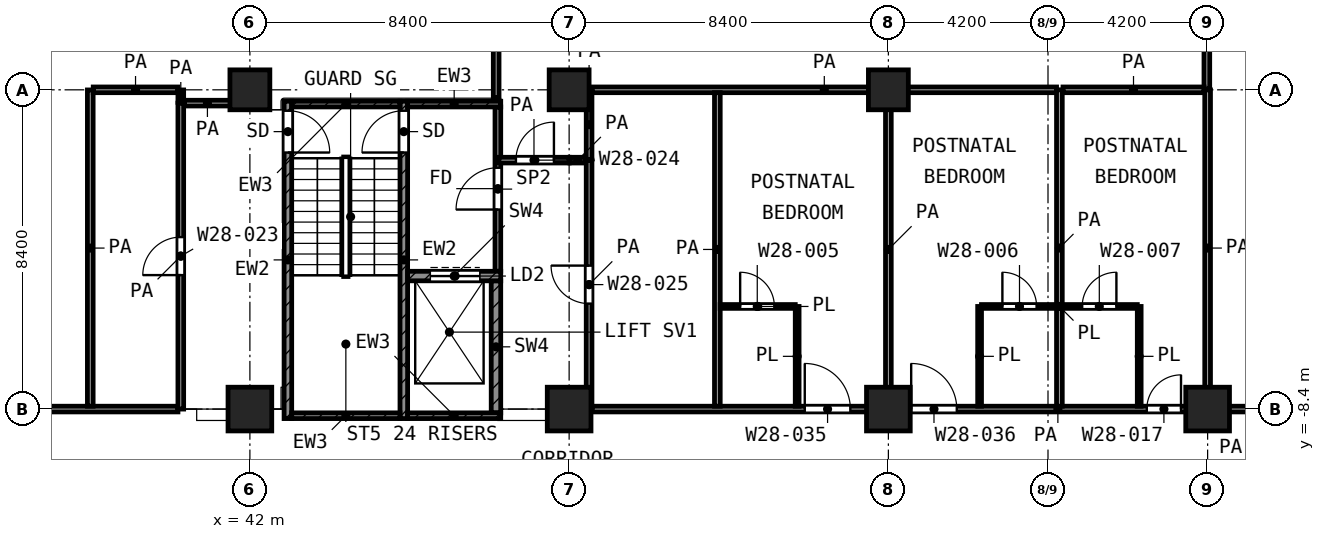
"""IFC4 building model, lengths in metres.
Left out: names, types, materials, properties, quantities, classifications, styles, units other than length and angle.
Written with IfcOpenShell. Run it as: python <this file> out.ifc"""

import sys

from ifc_helpers import new_model, si_unit, direction, frame, frame_2d, origin, origin_2d, place, context, subcontext, project, spatial, rectangle, extrude, element, fill, save


model = new_model("IFC4")
c1 = context("Model", 3, precision=1e-05, world=origin(), true_north=direction((0.0, 1.0)))
c2 = subcontext(c1, "Body", "Model", "MODEL_VIEW")
j1 = project(units=[si_unit("LENGTHUNIT", "METRE"), si_unit("PLANEANGLEUNIT", "RADIAN")], contexts=[c1])
p1 = place(None, origin())
s1 = spatial("IfcSite", under=j1, at=p1, CompositionType="ELEMENT")
p2 = place(p1, origin())
s2 = spatial("IfcBuilding", under=s1, at=p2, CompositionType="ELEMENT")
p3 = place(p2, frame((0.0, 0.0, 124.0)))
s3 = spatial("IfcBuildingStorey", under=s2, at=p3, CompositionType="ELEMENT", Elevation=124.0)
for number, where, z_axis, x_axis in (
    (1, (42.0, 0.0, 0.0), (0.0, 0.0, 1.0), (1.0, 0.0, 0.0)),
    (2, (50.4, 0.0, 0.0), (0.0, 0.0, 1.0), (1.0, 0.0, 0.0)),
    (3, (58.8, 0.0, 0.0), (0.0, 0.0, 1.0), (1.0, 0.0, 0.0)),
):
    element("IfcColumn", number, at=place(p3, frame(where, z_axis=z_axis, x_axis=x_axis)), inside=s3, PredefinedType="COLUMN", context=c2, shape_type="SweptSolid", body=[
        extrude(rectangle(XDim=1.05, YDim=1.05, at=origin_2d()), origin(), (0.0, 0.0, 1.0), 4.2),
    ])
for number, where, z_axis, x_axis in (
    (4, (42.0, -8.4, 0.0), (0.0, 0.0, 1.0), (1.0, 0.0, 0.0)),
    (5, (50.4, -8.4, 0.0), (0.0, 0.0, 1.0), (1.0, 0.0, 0.0)),
    (6, (58.8, -8.4, 0.0), (0.0, 0.0, 1.0), (1.0, 0.0, 0.0)),
    (7, (67.2, -8.4, 0.0), (0.0, 0.0, 1.0), (1.0, 0.0, 0.0)),
):
    element("IfcColumn", number, at=place(p3, frame(where, z_axis=z_axis, x_axis=x_axis)), inside=s3, PredefinedType="COLUMN", context=c2, shape_type="SweptSolid", body=[
        extrude(rectangle(XDim=1.15, YDim=1.15, at=origin_2d()), origin(), (0.0, 0.0, 1.0), 4.2),
    ])
p4 = place(p3, frame((43.0, -8.65, 0.0), z_axis=(0.0, 0.0, 1.0), x_axis=(0.0, 1.0, 0.0)))
e8 = element("IfcWall", 8, at=p4, inside=s3, PredefinedType="SHEAR", context=c2, shape_type="SweptSolid", body=[
    extrude(rectangle(XDim=8.35, YDim=0.2, at=frame_2d((4.175, 0.0))), origin(), (0.0, 0.0, 1.0), 3.6),
])
p5 = place(p4, frame((7.0, 0.0, 0.0)))
e9 = element("IfcOpeningElement", 9, at=p5, cuts=e8, PredefinedType="OPENING", context=c2, shape_type="SweptSolid", body=[
    extrude(rectangle(XDim=1.1, YDim=2.1, at=frame_2d((0.55, 1.05))), frame((0.0, 0.11, 0.0), z_axis=(0.0, -1.0, 0.0), x_axis=(1.0, 0.0, 0.0)), (0.0, 0.0, 1.0), 0.22),
])
p6 = place(p3, frame((46.05, -8.65, 0.0), z_axis=(0.0, 0.0, 1.0), x_axis=(0.0, 1.0, 0.0)))
e10 = element("IfcWall", 10, at=p6, inside=s3, PredefinedType="SHEAR", context=c2, shape_type="SweptSolid", body=[
    extrude(rectangle(XDim=8.35, YDim=0.2, at=frame_2d((4.175, 0.0))), origin(), (0.0, 0.0, 1.0), 3.6),
])
p7 = place(p6, frame((7.0, 0.0, 0.0)))
e11 = element("IfcOpeningElement", 11, at=p7, cuts=e10, PredefinedType="OPENING", context=c2, shape_type="SweptSolid", body=[
    extrude(rectangle(XDim=1.1, YDim=2.1, at=frame_2d((0.55, 1.05))), frame((0.0, 0.11, 0.0), z_axis=(0.0, -1.0, 0.0), x_axis=(1.0, 0.0, 0.0)), (0.0, 0.0, 1.0), 0.22),
])
p8 = place(p3, frame((43.1, -0.375, 0.0), z_axis=(0.0, 0.0, 1.0), x_axis=(1.0, 0.0, 0.0)))
e12 = element("IfcWall", 12, at=p8, inside=s3, PredefinedType="SHEAR", context=c2, shape_type="SweptSolid", body=[
    extrude(rectangle(XDim=2.85, YDim=0.15, at=frame_2d((1.425, 0.0))), origin(), (0.0, 0.0, 1.0), 3.6),
])
p9 = place(p3, frame((46.15, -0.375, 0.0), z_axis=(0.0, 0.0, 1.0), x_axis=(1.0, 0.0, 0.0)))
e13 = element("IfcWall", 13, at=p9, inside=s3, PredefinedType="SHEAR", context=c2, shape_type="SweptSolid", body=[
    extrude(rectangle(XDim=2.45, YDim=0.15, at=frame_2d((1.225, 0.0))), origin(), (0.0, 0.0, 1.0), 3.6),
])
p10 = place(p3, frame((43.1, -8.575, 0.0), z_axis=(0.0, 0.0, 1.0), x_axis=(1.0, 0.0, 0.0)))
e14 = element("IfcWall", 14, at=p10, inside=s3, PredefinedType="SHEAR", context=c2, shape_type="SweptSolid", body=[
    extrude(rectangle(XDim=2.85, YDim=0.15, at=frame_2d((1.425, 0.0))), origin(), (0.0, 0.0, 1.0), 3.6),
])
p11 = place(p3, frame((46.15, -8.575, 0.0), z_axis=(0.0, 0.0, 1.0), x_axis=(1.0, 0.0, 0.0)))
e15 = element("IfcWall", 15, at=p11, inside=s3, PredefinedType="SHEAR", context=c2, shape_type="SweptSolid", body=[
    extrude(rectangle(XDim=2.45, YDim=0.15, at=frame_2d((1.225, 0.0))), origin(), (0.0, 0.0, 1.0), 3.6),
])
p12 = place(p3, frame((46.15, -4.9, 0.0), z_axis=(0.0, 0.0, 1.0), x_axis=(1.0, 0.0, 0.0)))
e16 = element("IfcWall", 16, at=p12, inside=s3, PredefinedType="SHEAR", context=c2, shape_type="SweptSolid", body=[
    extrude(rectangle(XDim=2.45, YDim=0.25, at=frame_2d((1.225, 0.0))), origin(), (0.0, 0.0, 1.0), 3.6),
])
p13 = place(p12, frame((0.6, 0.0, 0.0)))
e17 = element("IfcOpeningElement", 17, at=p13, cuts=e16, PredefinedType="OPENING", context=c2, shape_type="SweptSolid", body=[
    extrude(rectangle(XDim=1.3, YDim=2.1, at=frame_2d((0.65, 1.05))), frame((0.0, 0.135, 0.0), z_axis=(0.0, -1.0, 0.0), x_axis=(1.0, 0.0, 0.0)), (0.0, 0.0, 1.0), 0.27),
])
p14 = place(p3, frame((48.475, -8.5, 0.0), z_axis=(0.0, 0.0, 1.0), x_axis=(0.0, 1.0, 0.0)))
e18 = element("IfcWall", 18, at=p14, inside=s3, PredefinedType="SHEAR", context=c2, shape_type="SweptSolid", body=[
    extrude(rectangle(XDim=3.475, YDim=0.25, at=frame_2d((1.738, 0.0))), origin(), (0.0, 0.0, 1.0), 3.6),
])
p15 = place(p3, frame((48.525, -4.775, 0.0), z_axis=(0.0, 0.0, 1.0), x_axis=(0.0, 1.0, 0.0)))
e19 = element("IfcWall", 19, at=p15, inside=s3, PredefinedType="PARTITIONING", context=c2, shape_type="SweptSolid", body=[
    extrude(rectangle(XDim=4.325, YDim=0.15, at=frame_2d((2.163, 0.0))), origin(), (0.0, 0.0, 1.0), 3.6),
])
p16 = place(p15, frame((1.625, 0.0, 0.0)))
e20 = element("IfcOpeningElement", 20, at=p16, cuts=e19, PredefinedType="OPENING", context=c2, shape_type="SweptSolid", body=[
    extrude(rectangle(XDim=1.1, YDim=2.1, at=frame_2d((0.55, 1.05))), frame((0.0, 0.085, 0.0), z_axis=(0.0, -1.0, 0.0), x_axis=(1.0, 0.0, 0.0)), (0.0, 0.0, 1.0), 0.17),
])
p17 = place(p3, frame((54.375, -5.7, 0.0), z_axis=(0.0, 0.0, 1.0), x_axis=(1.0, 0.0, 0.0)))
e21 = element("IfcWall", 21, at=p17, inside=s3, PredefinedType="PARTITIONING", context=c2, shape_type="SweptSolid", body=[
    extrude(rectangle(XDim=1.975, YDim=0.1, at=frame_2d((0.988, 0.0))), origin(), (0.0, 0.0, 1.0), 3.6),
])
p18 = place(p17, frame((0.525, 0.0, 0.0)))
e22 = element("IfcOpeningElement", 22, at=p18, cuts=e21, PredefinedType="OPENING", context=c2, shape_type="SweptSolid", body=[
    extrude(rectangle(XDim=0.9, YDim=2.1, at=frame_2d((0.45, 1.05))), frame((0.0, 0.06, 0.0), z_axis=(0.0, -1.0, 0.0), x_axis=(1.0, 0.0, 0.0)), (0.0, 0.0, 1.0), 0.12),
])
p19 = place(p3, frame((61.25, -5.7, 0.0), z_axis=(0.0, 0.0, 1.0), x_axis=(1.0, 0.0, 0.0)))
e23 = element("IfcWall", 23, at=p19, inside=s3, PredefinedType="PARTITIONING", context=c2, shape_type="SweptSolid", body=[
    extrude(rectangle(XDim=4.1, YDim=0.1, at=frame_2d((2.05, 0.0))), origin(), (0.0, 0.0, 1.0), 3.6),
])
p20 = place(p19, frame((0.55, 0.0, 0.0)))
e24 = element("IfcOpeningElement", 24, at=p20, cuts=e23, PredefinedType="OPENING", context=c2, shape_type="SweptSolid", body=[
    extrude(rectangle(XDim=0.9, YDim=2.1, at=frame_2d((0.45, 1.05))), frame((0.0, 0.06, 0.0), z_axis=(0.0, -1.0, 0.0), x_axis=(1.0, 0.0, 0.0)), (0.0, 0.0, 1.0), 0.12),
])
p21 = place(p19, frame((2.65, 0.0, 0.0)))
e25 = element("IfcOpeningElement", 25, at=p21, cuts=e23, PredefinedType="OPENING", context=c2, shape_type="SweptSolid", body=[
    extrude(rectangle(XDim=0.9, YDim=2.1, at=frame_2d((0.45, 1.05))), frame((0.0, 0.06, 0.0), z_axis=(0.0, -1.0, 0.0), x_axis=(1.0, 0.0, 0.0)), (0.0, 0.0, 1.0), 0.12),
])
for number, where, z_axis, x_axis in (
    (26, (56.4, -8.325, 0.0), (0.0, 0.0, 1.0), (0.0, 1.0, 0.0)),
    (27, (61.2, -8.325, 0.0), (0.0, 0.0, 1.0), (0.0, 1.0, 0.0)),
    (28, (65.4, -8.325, 0.0), (0.0, 0.0, 1.0), (0.0, 1.0, 0.0)),
):
    element("IfcWall", number, at=place(p3, frame(where, z_axis=z_axis, x_axis=x_axis)), inside=s3, PredefinedType="PARTITIONING", context=c2, shape_type="SweptSolid", body=[
        extrude(rectangle(XDim=2.625, YDim=0.1, at=frame_2d((1.312, 0.0))), origin(), (0.0, 0.0, 1.0), 3.6),
    ])
p22 = place(p3, frame((25.0, -8.4, 0.0), z_axis=(0.0, 0.0, 1.0), x_axis=(1.0, 0.0, 0.0)))
e29 = element("IfcWall", 29, at=p22, inside=s3, PredefinedType="PARTITIONING", context=c2, shape_type="SweptSolid", body=[
    extrude(rectangle(XDim=15.107, YDim=0.15, at=frame_2d((7.553, 0.0))), origin(), (0.0, 0.0, 1.0), 3.6),
])
p23 = place(p22, frame((3.9, 0.0, 0.0)))
e30 = element("IfcOpeningElement", 30, at=p23, cuts=e29, PredefinedType="OPENING", context=c2, shape_type="SweptSolid", body=[
    extrude(rectangle(XDim=1.0, YDim=2.1, at=frame_2d((0.5, 1.05))), frame((0.0, 0.085, 0.0), z_axis=(0.0, -1.0, 0.0), x_axis=(1.0, 0.0, 0.0)), (0.0, 0.0, 1.0), 0.17),
])
p24 = place(p22, frame((10.1, 0.0, 0.0)))
e31 = element("IfcOpeningElement", 31, at=p24, cuts=e29, PredefinedType="OPENING", context=c2, shape_type="SweptSolid", body=[
    extrude(rectangle(XDim=1.2, YDim=2.1, at=frame_2d((0.6, 1.05))), frame((0.0, 0.085, 0.0), z_axis=(0.0, -1.0, 0.0), x_axis=(1.0, 0.0, 0.0)), (0.0, 0.0, 1.0), 0.17),
])
p25 = place(p3, frame((51.0, -8.4, 0.0), z_axis=(0.0, 0.0, 1.0), x_axis=(1.0, 0.0, 0.0)))
e32 = element("IfcWall", 32, at=p25, inside=s3, PredefinedType="PARTITIONING", context=c2, shape_type="SweptSolid", body=[
    extrude(rectangle(XDim=24.52, YDim=0.15, at=frame_2d((12.26, 0.0))), origin(), (0.0, 0.0, 1.0), 3.6),
])
p26 = place(p25, frame((5.6, 0.0, 0.0)))
e33 = element("IfcOpeningElement", 33, at=p26, cuts=e32, PredefinedType="OPENING", context=c2, shape_type="SweptSolid", body=[
    extrude(rectangle(XDim=1.2, YDim=2.1, at=frame_2d((0.6, 1.05))), frame((0.0, 0.085, 0.0), z_axis=(0.0, -1.0, 0.0), x_axis=(1.0, 0.0, 0.0)), (0.0, 0.0, 1.0), 0.17),
])
p27 = place(p25, frame((8.4, 0.0, 0.0)))
e34 = element("IfcOpeningElement", 34, at=p27, cuts=e32, PredefinedType="OPENING", context=c2, shape_type="SweptSolid", body=[
    extrude(rectangle(XDim=1.2, YDim=2.1, at=frame_2d((0.6, 1.05))), frame((0.0, 0.085, 0.0), z_axis=(0.0, -1.0, 0.0), x_axis=(1.0, 0.0, 0.0)), (0.0, 0.0, 1.0), 0.17),
])
p28 = place(p25, frame((14.6, 0.0, 0.0)))
e35 = element("IfcOpeningElement", 35, at=p28, cuts=e32, PredefinedType="OPENING", context=c2, shape_type="SweptSolid", body=[
    extrude(rectangle(XDim=0.9, YDim=2.1, at=frame_2d((0.45, 1.05))), frame((0.0, 0.085, 0.0), z_axis=(0.0, -1.0, 0.0), x_axis=(1.0, 0.0, 0.0)), (0.0, 0.0, 1.0), 0.17),
])
p29 = place(p25, frame((19.65, 0.0, 0.0)))
e36 = element("IfcOpeningElement", 36, at=p29, cuts=e32, PredefinedType="OPENING", context=c2, shape_type="SweptSolid", body=[
    extrude(rectangle(XDim=1.5, YDim=2.1, at=frame_2d((0.75, 1.05))), frame((0.0, 0.085, 0.0), z_axis=(0.0, -1.0, 0.0), x_axis=(1.0, 0.0, 0.0)), (0.0, 0.0, 1.0), 0.17),
])
p30 = place(p3, frame((48.55, -1.85, 0.0), z_axis=(0.0, 0.0, 1.0), x_axis=(1.0, 0.0, 0.0)))
e37 = element("IfcWall", 37, at=p30, inside=s3, PredefinedType="PARTITIONING", context=c2, shape_type="SweptSolid", body=[
    extrude(rectangle(XDim=1.85, YDim=0.15, at=frame_2d((0.925, 0.0))), origin(), (0.0, 0.0, 1.0), 3.6),
])
p31 = place(p30, frame((0.45, 0.0, 0.0)))
e38 = element("IfcOpeningElement", 38, at=p31, cuts=e37, PredefinedType="OPENING", context=c2, shape_type="SweptSolid", body=[
    extrude(rectangle(XDim=1.0, YDim=2.1, at=frame_2d((0.5, 1.05))), frame((0.0, 0.085, 0.0), z_axis=(0.0, -1.0, 0.0), x_axis=(1.0, 0.0, 0.0)), (0.0, 0.0, 1.0), 0.17),
])
p32 = place(p3, frame((50.42, -1.85, 0.0), z_axis=(0.0, 0.0, 1.0), x_axis=(1.0, 0.0, 0.0)))
e39 = element("IfcWall", 39, at=p32, inside=s3, PredefinedType="PARTITIONING", context=c2, shape_type="SweptSolid", body=[
    extrude(rectangle(XDim=0.41, YDim=0.15, at=frame_2d((0.205, 0.0))), origin(), (0.0, 0.0, 1.0), 3.6),
])
p33 = place(p3, frame((40.277, -0.35, 0.0), z_axis=(0.0, 0.0, 1.0), x_axis=(1.0, 0.0, 0.0)))
e40 = element("IfcWall", 40, at=p33, inside=s3, PredefinedType="PARTITIONING", context=c2, shape_type="SweptSolid", body=[
    extrude(rectangle(XDim=1.211, YDim=0.15, at=frame_2d((0.605, 0.0))), origin(), (0.0, 0.0, 1.0), 3.6),
])
p34 = place(p3, frame((37.878, 0.0, 0.0), z_axis=(0.0, 0.0, 1.0), x_axis=(1.0, 0.0, 0.0)))
e41 = element("IfcWall", 41, at=p34, inside=s3, PredefinedType="PARTITIONING", context=c2, shape_type="SweptSolid", body=[
    extrude(rectangle(XDim=2.226, YDim=0.15, at=frame_2d((1.113, 0.0))), origin(), (0.0, 0.0, 1.0), 3.6),
])
p35 = place(p3, frame((51.003, 0.0, 0.0), z_axis=(0.0, 0.0, 1.0), x_axis=(1.0, 0.0, 0.0)))
e42 = element("IfcWall", 42, at=p35, inside=s3, PredefinedType="PARTITIONING", context=c2, shape_type="SweptSolid", body=[
    extrude(rectangle(XDim=12.222, YDim=0.15, at=frame_2d((6.111, 0.0))), origin(), (0.0, 0.0, 1.0), 3.6),
])
p36 = place(p3, frame((63.395, 0.0, 0.0), z_axis=(0.0, 0.0, 1.0), x_axis=(1.0, 0.0, 0.0)))
e43 = element("IfcWall", 43, at=p36, inside=s3, PredefinedType="PARTITIONING", context=c2, shape_type="SweptSolid", body=[
    extrude(rectangle(XDim=3.71, YDim=0.15, at=frame_2d((1.855, 0.0))), origin(), (0.0, 0.0, 1.0), 3.6),
])
p37 = place(p3, frame((37.8, -8.325, 0.0), z_axis=(0.0, 0.0, 1.0), x_axis=(0.0, 1.0, 0.0)))
e44 = element("IfcWall", 44, at=p37, inside=s3, PredefinedType="PARTITIONING", context=c2, shape_type="SweptSolid", body=[
    extrude(rectangle(XDim=8.322, YDim=0.15, at=frame_2d((4.161, 0.0))), origin(), (0.0, 0.0, 1.0), 3.6),
])
p38 = place(p3, frame((40.182, -8.4, 0.0), z_axis=(0.0, 0.0, 1.0), x_axis=(0.0, 1.0, 0.0)))
e45 = element("IfcWall", 45, at=p38, inside=s3, PredefinedType="PARTITIONING", context=c2, shape_type="SweptSolid", body=[
    extrude(rectangle(XDim=8.05, YDim=0.15, at=frame_2d((4.025, 0.0))), origin(), (0.0, 0.0, 1.0), 3.6),
])
p39 = place(p38, frame((3.525, 0.0, 0.0)))
e46 = element("IfcOpeningElement", 46, at=p39, cuts=e45, PredefinedType="OPENING", context=c2, shape_type="SweptSolid", body=[
    extrude(rectangle(XDim=1.0, YDim=2.1, at=frame_2d((0.5, 1.05))), frame((0.0, 0.085, 0.0), z_axis=(0.0, -1.0, 0.0), x_axis=(1.0, 0.0, 0.0)), (0.0, 0.0, 1.0), 0.17),
])
p40 = place(p3, frame((40.182, -0.33, 0.0), z_axis=(0.0, 0.0, 1.0), x_axis=(0.0, 1.0, 0.0)))
e47 = element("IfcWall", 47, at=p40, inside=s3, PredefinedType="PARTITIONING", context=c2, shape_type="SweptSolid", body=[
    extrude(rectangle(XDim=0.327, YDim=0.15, at=frame_2d((0.164, 0.0))), origin(), (0.0, 0.0, 1.0), 3.6),
])
p41 = place(p3, frame((48.48, -0.2, 0.0), z_axis=(0.0, 0.0, 1.0), x_axis=(0.0, 1.0, 0.0)))
e48 = element("IfcWall", 48, at=p41, inside=s3, PredefinedType="PARTITIONING", context=c2, shape_type="SweptSolid", body=[
    extrude(rectangle(XDim=6.12, YDim=0.15, at=frame_2d((3.06, 0.0))), origin(), (0.0, 0.0, 1.0), 3.6),
])
p42 = place(p3, frame((50.925, -8.4, 0.0), z_axis=(0.0, 0.0, 1.0), x_axis=(0.0, 1.0, 0.0)))
e49 = element("IfcWall", 49, at=p42, inside=s3, PredefinedType="PARTITIONING", context=c2, shape_type="SweptSolid", body=[
    extrude(rectangle(XDim=6.55, YDim=0.15, at=frame_2d((3.275, 0.0))), origin(), (0.0, 0.0, 1.0), 3.6),
])
p43 = place(p42, frame((2.775, 0.0, 0.0)))
e50 = element("IfcOpeningElement", 50, at=p43, cuts=e49, PredefinedType="OPENING", context=c2, shape_type="SweptSolid", body=[
    extrude(rectangle(XDim=1.0, YDim=2.1, at=frame_2d((0.5, 1.05))), frame((0.0, 0.085, 0.0), z_axis=(0.0, -1.0, 0.0), x_axis=(1.0, 0.0, 0.0)), (0.0, 0.0, 1.0), 0.17),
])
p44 = place(p3, frame((50.925, -1.83, 0.0), z_axis=(0.0, 0.0, 1.0), x_axis=(0.0, 1.0, 0.0)))
e51 = element("IfcWall", 51, at=p44, inside=s3, PredefinedType="PARTITIONING", context=c2, shape_type="SweptSolid", body=[
    extrude(rectangle(XDim=1.827, YDim=0.15, at=frame_2d((0.914, 0.0))), origin(), (0.0, 0.0, 1.0), 3.6),
])
for number, where, z_axis, x_axis in (
    (52, (54.3, -8.325, 0.0), (0.0, 0.0, 1.0), (0.0, 1.0, 0.0)),
    (53, (58.8, -8.325, 0.0), (0.0, 0.0, 1.0), (0.0, 1.0, 0.0)),
):
    element("IfcWall", number, at=place(p3, frame(where, z_axis=z_axis, x_axis=x_axis)), inside=s3, PredefinedType="PARTITIONING", context=c2, shape_type="SweptSolid", body=[
        extrude(rectangle(XDim=8.25, YDim=0.15, at=frame_2d((4.125, 0.0))), origin(), (0.0, 0.0, 1.0), 3.6),
    ])
p45 = place(p3, frame((63.3, -8.325, 0.0), z_axis=(0.0, 0.0, 1.0), x_axis=(0.0, 1.0, 0.0)))
e54 = element("IfcWall", 54, at=p45, inside=s3, PredefinedType="PARTITIONING", context=c2, shape_type="SweptSolid", body=[
    extrude(rectangle(XDim=8.325, YDim=0.15, at=frame_2d((4.163, 0.0))), origin(), (0.0, 0.0, 1.0), 3.6),
])
p46 = place(p3, frame((67.18, 0.02, 0.0), z_axis=(0.0, 0.0, 1.0), x_axis=(0.0, 1.0, 0.0)))
e55 = element("IfcWall", 55, at=p46, inside=s3, PredefinedType="PARTITIONING", context=c2, shape_type="SweptSolid", body=[
    extrude(rectangle(XDim=5.9, YDim=0.15, at=frame_2d((2.95, 0.0))), origin(), (0.0, 0.0, 1.0), 3.6),
])
p47 = place(p3, frame((67.2, -8.325, 0.0), z_axis=(0.0, 0.0, 1.0), x_axis=(0.0, 1.0, 0.0)))
e56 = element("IfcWall", 56, at=p47, inside=s3, PredefinedType="PARTITIONING", context=c2, shape_type="SweptSolid", body=[
    extrude(rectangle(XDim=8.323, YDim=0.15, at=frame_2d((4.162, 0.0))), origin(), (0.0, 0.0, 1.0), 3.6),
])
p48 = place(p5, frame((1.1, 0.0, 0.0), z_axis=(0.0, 0.0, 1.0), x_axis=(-1.0, 0.0, 0.0)))
e57 = element("IfcDoor", 57, at=p48, inside=s3, OperationType="SINGLE_SWING_LEFT", PredefinedType="DOOR", context=c2, shape_type="SweptSolid", body=[
    extrude(rectangle(XDim=1.1, YDim=2.1, at=frame_2d((0.55, 1.05))), frame((0.0, 0.025, 0.0), z_axis=(0.0, -1.0, 0.0), x_axis=(1.0, 0.0, 0.0)), (0.0, 0.0, 1.0), 0.05),
])
fill(e9, e57)
p49 = place(p7, origin())
e58 = element("IfcDoor", 58, at=p49, inside=s3, OperationType="SINGLE_SWING_LEFT", PredefinedType="DOOR", context=c2, shape_type="SweptSolid", body=[
    extrude(rectangle(XDim=1.1, YDim=2.1, at=frame_2d((0.55, 1.05))), frame((0.0, 0.025, 0.0), z_axis=(0.0, -1.0, 0.0), x_axis=(1.0, 0.0, 0.0)), (0.0, 0.0, 1.0), 0.05),
])
fill(e11, e58)
p50 = place(p13, origin())
e59 = element("IfcDoor", 59, at=p50, inside=s3, OperationType="DOUBLE_DOOR_SLIDING", PredefinedType="DOOR", context=c2, shape_type="SweptSolid", body=[
    extrude(rectangle(XDim=1.3, YDim=2.1, at=frame_2d((0.65, 1.05))), frame((0.0, 0.025, 0.0), z_axis=(0.0, -1.0, 0.0), x_axis=(1.0, 0.0, 0.0)), (0.0, 0.0, 1.0), 0.05),
])
fill(e17, e59)
p51 = place(p16, origin())
e60 = element("IfcDoor", 60, at=p51, inside=s3, OperationType="SINGLE_SWING_LEFT", PredefinedType="DOOR", context=c2, shape_type="SweptSolid", body=[
    extrude(rectangle(XDim=1.1, YDim=2.1, at=frame_2d((0.55, 1.05))), frame((0.0, 0.025, 0.0), z_axis=(0.0, -1.0, 0.0), x_axis=(1.0, 0.0, 0.0)), (0.0, 0.0, 1.0), 0.05),
])
fill(e20, e60)
p52 = place(p39, origin())
e61 = element("IfcDoor", 61, at=p52, inside=s3, OperationType="SINGLE_SWING_LEFT", PredefinedType="DOOR", context=c2, shape_type="SweptSolid", body=[
    extrude(rectangle(XDim=1.0, YDim=2.1, at=frame_2d((0.5, 1.05))), frame((0.0, 0.025, 0.0), z_axis=(0.0, -1.0, 0.0), x_axis=(1.0, 0.0, 0.0)), (0.0, 0.0, 1.0), 0.05),
])
fill(e46, e61)
p53 = place(p31, origin())
e62 = element("IfcDoor", 62, at=p53, inside=s3, OperationType="SINGLE_SWING_RIGHT", PredefinedType="DOOR", context=c2, shape_type="SweptSolid", body=[
    extrude(rectangle(XDim=1.0, YDim=2.1, at=frame_2d((0.5, 1.05))), frame((0.0, 0.025, 0.0), z_axis=(0.0, -1.0, 0.0), x_axis=(1.0, 0.0, 0.0)), (0.0, 0.0, 1.0), 0.05),
])
fill(e38, e62)
p54 = place(p43, origin())
e63 = element("IfcDoor", 63, at=p54, inside=s3, OperationType="SINGLE_SWING_RIGHT", PredefinedType="DOOR", context=c2, shape_type="SweptSolid", body=[
    extrude(rectangle(XDim=1.0, YDim=2.1, at=frame_2d((0.5, 1.05))), frame((0.0, 0.025, 0.0), z_axis=(0.0, -1.0, 0.0), x_axis=(1.0, 0.0, 0.0)), (0.0, 0.0, 1.0), 0.05),
])
fill(e50, e63)
p55 = place(p26, origin())
e64 = element("IfcDoor", 64, at=p55, inside=s3, OperationType="SINGLE_SWING_LEFT", PredefinedType="DOOR", context=c2, shape_type="SweptSolid", body=[
    extrude(rectangle(XDim=1.2, YDim=2.1, at=frame_2d((0.6, 1.05))), frame((0.0, 0.025, 0.0), z_axis=(0.0, -1.0, 0.0), x_axis=(1.0, 0.0, 0.0)), (0.0, 0.0, 1.0), 0.05),
])
fill(e33, e64)
p56 = place(p18, origin())
e65 = element("IfcDoor", 65, at=p56, inside=s3, OperationType="SINGLE_SWING_LEFT", PredefinedType="DOOR", context=c2, shape_type="SweptSolid", body=[
    extrude(rectangle(XDim=0.9, YDim=2.1, at=frame_2d((0.45, 1.05))), frame((0.0, 0.025, 0.0), z_axis=(0.0, -1.0, 0.0), x_axis=(1.0, 0.0, 0.0)), (0.0, 0.0, 1.0), 0.05),
])
fill(e22, e65)
p57 = place(p27, origin())
e66 = element("IfcDoor", 66, at=p57, inside=s3, OperationType="SINGLE_SWING_LEFT", PredefinedType="DOOR", context=c2, shape_type="SweptSolid", body=[
    extrude(rectangle(XDim=1.2, YDim=2.1, at=frame_2d((0.6, 1.05))), frame((0.0, 0.025, 0.0), z_axis=(0.0, -1.0, 0.0), x_axis=(1.0, 0.0, 0.0)), (0.0, 0.0, 1.0), 0.05),
])
fill(e34, e66)
p58 = place(p20, origin())
e67 = element("IfcDoor", 67, at=p58, inside=s3, OperationType="SINGLE_SWING_LEFT", PredefinedType="DOOR", context=c2, shape_type="SweptSolid", body=[
    extrude(rectangle(XDim=0.9, YDim=2.1, at=frame_2d((0.45, 1.05))), frame((0.0, 0.025, 0.0), z_axis=(0.0, -1.0, 0.0), x_axis=(1.0, 0.0, 0.0)), (0.0, 0.0, 1.0), 0.05),
])
fill(e24, e67)
p59 = place(p28, origin())
e68 = element("IfcDoor", 68, at=p59, inside=s3, OperationType="SINGLE_SWING_RIGHT", PredefinedType="DOOR", context=c2, shape_type="SweptSolid", body=[
    extrude(rectangle(XDim=0.9, YDim=2.1, at=frame_2d((0.45, 1.05))), frame((0.0, 0.025, 0.0), z_axis=(0.0, -1.0, 0.0), x_axis=(1.0, 0.0, 0.0)), (0.0, 0.0, 1.0), 0.05),
])
fill(e35, e68)
p60 = place(p21, origin())
e69 = element("IfcDoor", 69, at=p60, inside=s3, OperationType="SINGLE_SWING_RIGHT", PredefinedType="DOOR", context=c2, shape_type="SweptSolid", body=[
    extrude(rectangle(XDim=0.9, YDim=2.1, at=frame_2d((0.45, 1.05))), frame((0.0, 0.025, 0.0), z_axis=(0.0, -1.0, 0.0), x_axis=(1.0, 0.0, 0.0)), (0.0, 0.0, 1.0), 0.05),
])
fill(e25, e69)
save(model, sys.argv[1])
